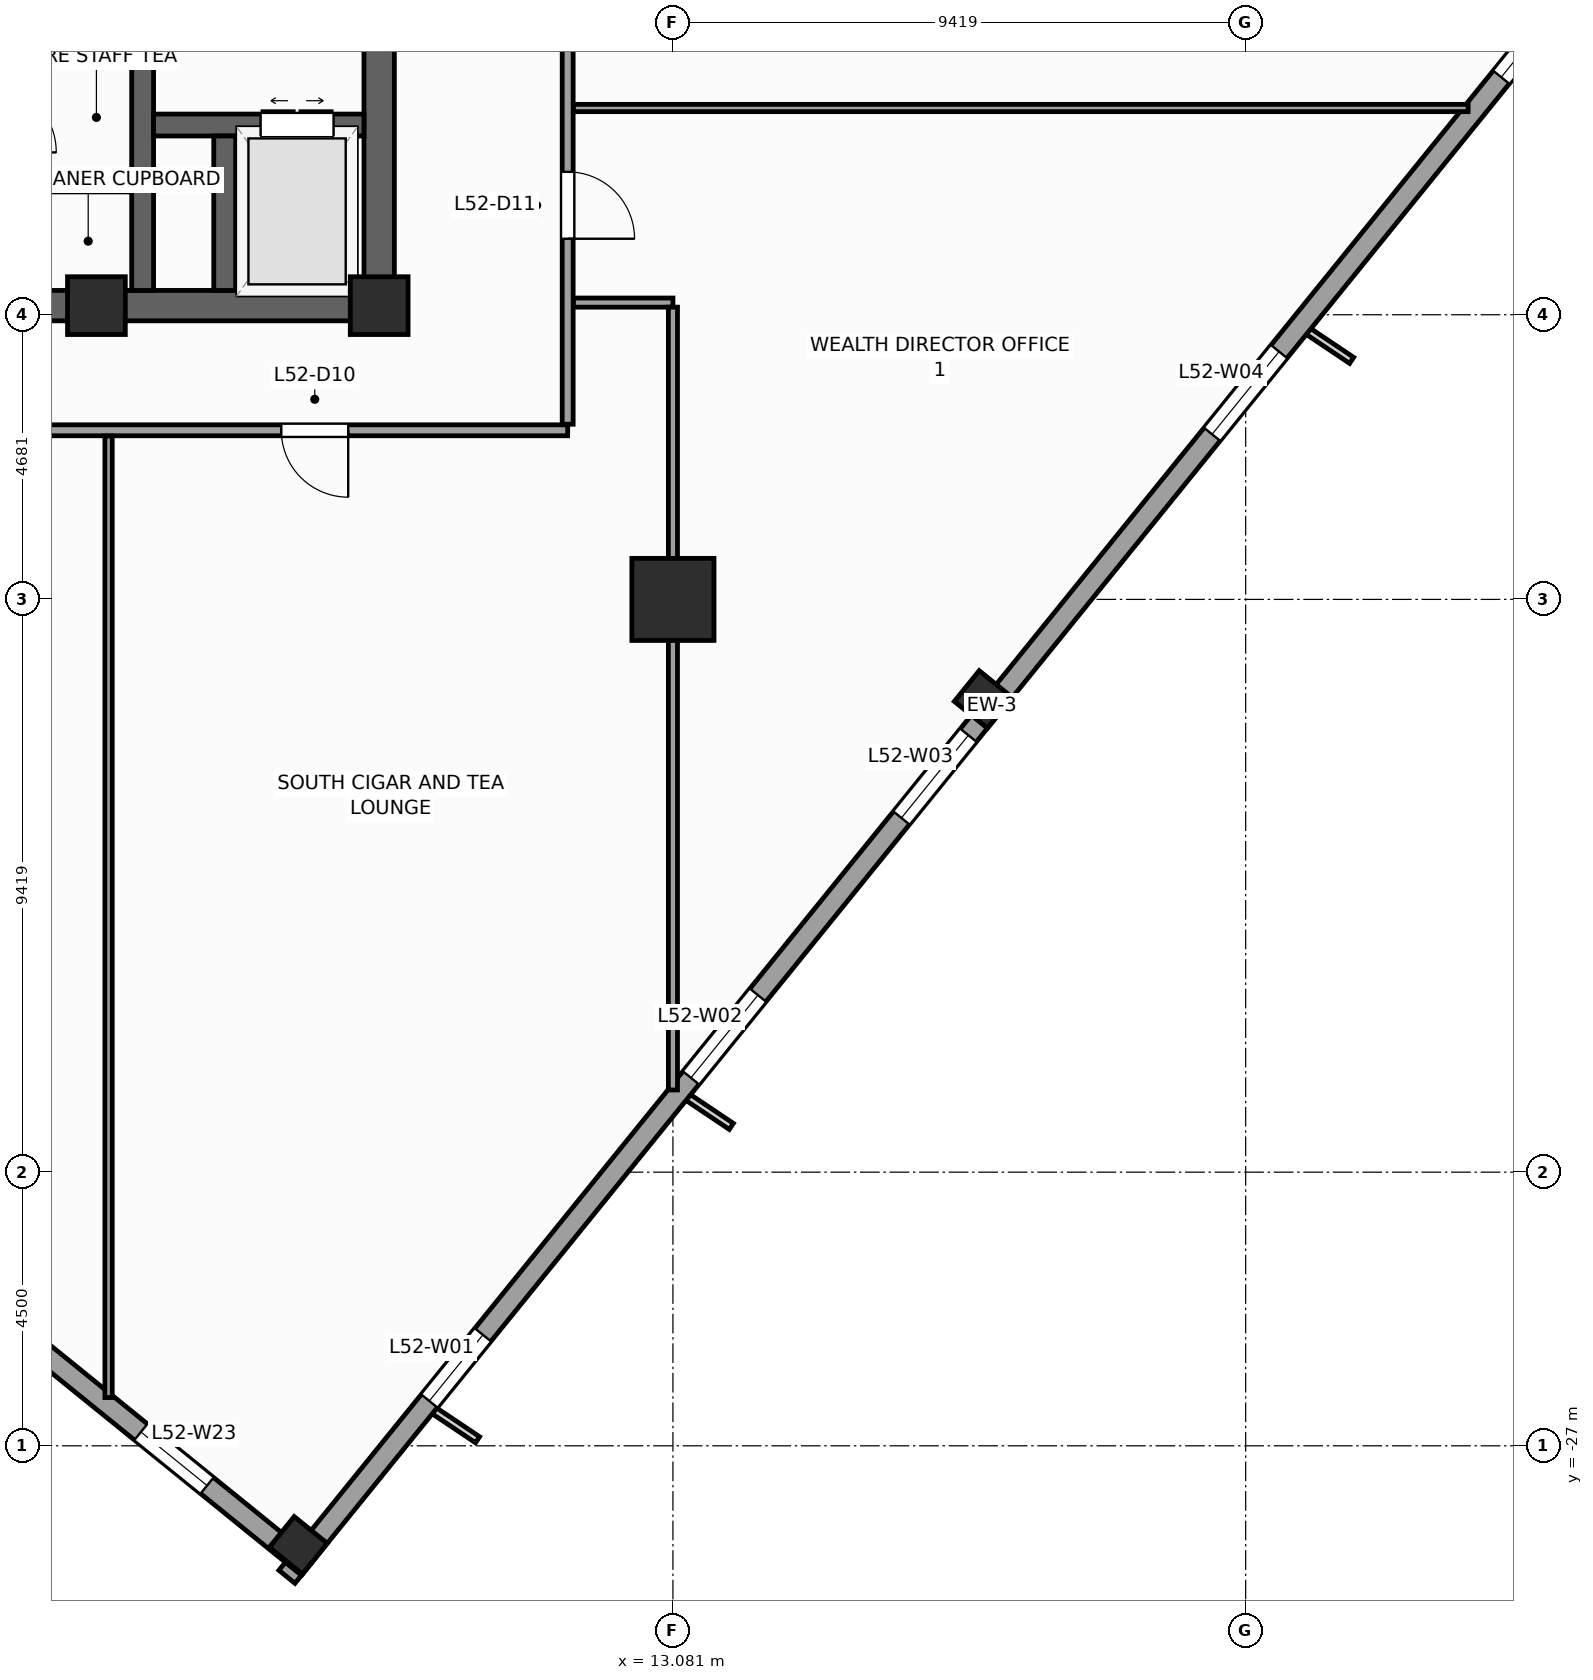
"""IFC4 building model, lengths in metres.
Left out: names, types, materials, properties, quantities, classifications, styles, units other than length and angle.
Written with IfcOpenShell. Run it as: python <this file> out.ifc"""

import sys

from ifc_helpers import new_model, si_unit, direction, frame, frame_2d, origin, origin_2d, place, context, subcontext, project, spatial, rectangle, extrude, source, transform, mapped, element, fill, save


model = new_model("IFC4")
c1 = context("Model", 3, precision=1e-05, world=origin(), true_north=direction((0.0, 1.0)))
c2 = subcontext(c1, "Body", "Model", "MODEL_VIEW")
j1 = project(units=[si_unit("LENGTHUNIT", "METRE"), si_unit("PLANEANGLEUNIT", "RADIAN")], contexts=[c1])
p1 = place(None, origin())
s1 = spatial("IfcSite", under=j1, at=p1, CompositionType="ELEMENT")
p2 = place(p1, origin())
s2 = spatial("IfcBuilding", under=s1, at=p2, CompositionType="ELEMENT")
p3 = place(p2, frame((0.0, 0.0, 217.3)))
s3 = spatial("IfcBuildingStorey", under=s2, at=p3, CompositionType="ELEMENT", Elevation=217.3)
p4 = place(p3, frame((-8.5, -8.25, 0.0), z_axis=(0.0, 0.0, 1.0), x_axis=(1.0, 0.0, 0.0)))
e1 = element("IfcWall", 1, at=p4, inside=s3, PredefinedType="SHEAR", context=c2, shape_type="SweptSolid", body=[
    extrude(rectangle(XDim=17.0, YDim=0.5, at=frame_2d((8.5, 0.0))), origin(), (0.0, 0.0, 1.0), 3.9),
])
p5 = place(p4, frame((7.85, 0.0, 0.0)))
e2 = element("IfcOpeningElement", 2, at=p5, cuts=e1, PredefinedType="OPENING", context=c2, shape_type="SweptSolid", body=[
    extrude(rectangle(XDim=1.3, YDim=2.2, at=frame_2d((0.65, 1.1))), frame((0.0, 0.26, 0.0), z_axis=(0.0, -1.0, 0.0), x_axis=(1.0, 0.0, 0.0)), (0.0, 0.0, 1.0), 0.52),
])
p6 = place(p3, frame((8.25, -8.0, 0.0), z_axis=(0.0, 0.0, 1.0), x_axis=(0.0, 1.0, 0.0)))
e3 = element("IfcWall", 3, at=p6, inside=s3, PredefinedType="SHEAR", context=c2, shape_type="SweptSolid", body=[
    extrude(rectangle(XDim=16.0, YDim=0.5, at=frame_2d((8.0, 0.0))), origin(), (0.0, 0.0, 1.0), 3.9),
])
p7 = place(p6, frame((4.69, 0.0, 0.0)))
e4 = element("IfcOpeningElement", 4, at=p7, cuts=e3, PredefinedType="OPENING", context=c2, shape_type="SweptSolid", body=[
    extrude(rectangle(XDim=1.3, YDim=2.2, at=frame_2d((0.65, 1.1))), frame((0.0, 0.26, 0.0), z_axis=(0.0, -1.0, 0.0), x_axis=(1.0, 0.0, 0.0)), (0.0, 0.0, 1.0), 0.52),
])
p8 = place(p3, frame((4.36, -8.0, 0.0), z_axis=(0.0, 0.0, 1.0), x_axis=(0.0, 1.0, 0.0)))
e5 = element("IfcWall", 5, at=p8, inside=s3, PredefinedType="SHEAR", context=c2, shape_type="SweptSolid", body=[
    extrude(rectangle(XDim=16.0, YDim=0.36, at=frame_2d((8.0, 0.0))), origin(), (0.0, 0.0, 1.0), 3.9),
])
p9 = place(p3, frame((4.54, -5.28, 0.0), z_axis=(0.0, 0.0, 1.0), x_axis=(1.0, 0.0, 0.0)))
e6 = element("IfcWall", 6, at=p9, inside=s3, PredefinedType="SHEAR", context=c2, shape_type="SweptSolid", body=[
    extrude(rectangle(XDim=3.46, YDim=0.36, at=frame_2d((1.73, 0.0))), origin(), (0.0, 0.0, 1.0), 3.9),
])
p10 = place(p9, frame((1.76, 0.0, 0.0)))
e7 = element("IfcOpeningElement", 7, at=p10, cuts=e6, PredefinedType="OPENING", context=c2, shape_type="SweptSolid", body=[
    extrude(rectangle(XDim=1.2, YDim=2.25, at=frame_2d((0.6, 1.125))), frame((0.0, 0.19, 0.0), z_axis=(0.0, -1.0, 0.0), x_axis=(1.0, 0.0, 0.0)), (0.0, 0.0, 1.0), 0.38),
])
p11 = place(p3, frame((5.71, -8.0, 0.0), z_axis=(0.0, 0.0, 1.0), x_axis=(0.0, 1.0, 0.0)))
e8 = element("IfcWall", 8, at=p11, inside=s3, PredefinedType="SHEAR", context=c2, shape_type="SweptSolid", body=[
    extrude(rectangle(XDim=2.54, YDim=0.36, at=frame_2d((1.27, 0.0))), origin(), (0.0, 0.0, 1.0), 3.9),
])
m1 = source(origin(), c2, "Body", "SweptSolid", [
    extrude(rectangle(XDim=0.95, YDim=0.95, at=origin_2d()), origin(), (0.0, 0.0, 1.0), 3.9),
])
for number, where, z_axis, x_axis in (
    (9, (8.25, -8.25, 0.0), (0.0, 0.0, 1.0), (1.0, 0.0, 0.0)),
    (10, (3.6, -8.25, 0.0), (0.0, 0.0, 1.0), (1.0, 0.0, 0.0)),
):
    element("IfcColumn", number, at=place(p3, frame(where, z_axis=z_axis, x_axis=x_axis)), inside=s3, PredefinedType="PILASTER", context=c2, shape_type="MappedRepresentation", body=[
        mapped(m1, transform((0.0, 0.0, 0.0), scale=1.0)),
    ])
m2 = source(origin(), c2, "Body", "SweptSolid", [
    extrude(rectangle(XDim=1.35, YDim=1.35, at=origin_2d()), origin(), (0.0, 0.0, 1.0), 3.9),
])
p12 = place(p3, frame((13.081, -13.081, 0.0), z_axis=(0.0, 0.0, 1.0), x_axis=(1.0, 0.0, 0.0)))
e11 = element("IfcColumn", 11, at=p12, inside=s3, PredefinedType="COLUMN", context=c2, shape_type="MappedRepresentation", body=[
    mapped(m2, transform((0.0, 0.0, 0.0), scale=1.0)),
])
m3 = source(origin(), c2, "Body", "SweptSolid", [
    extrude(rectangle(XDim=0.65, YDim=0.7, at=origin_2d()), origin(), (0.0, 0.0, 1.0), 3.9),
])
for number, where, z_axis, x_axis in (
    (12, (6.92, -28.637, 0.0), (0.0, 0.0, 1.0), (0.629, 0.777, 0.0)),
    (13, (18.185, -14.726, 0.0), (0.0, 0.0, 1.0), (0.629, 0.777, 0.0)),
):
    element("IfcColumn", number, at=place(p3, frame(where, z_axis=z_axis, x_axis=x_axis)), inside=s3, PredefinedType="COLUMN", context=c2, shape_type="MappedRepresentation", body=[
        mapped(m3, transform((0.0, 0.0, 0.0), scale=1.0)),
    ])
p13 = place(p3, frame((6.733, -29.154, 0.0), z_axis=(0.0, 0.0, 1.0), x_axis=(0.629325378072, 0.77714192302, 0.0)))
e14 = element("IfcWall", 14, at=p13, inside=s3, PredefinedType="STANDARD", context=c2, shape_type="SweptSolid", body=[
    extrude(rectangle(XDim=36.84, YDim=0.34, at=frame_2d((18.42, 0.0))), origin(), (0.0, 0.0, 1.0), 2.96),
])
p14 = place(p13, frame((3.721, 0.0, 0.48)))
e15 = element("IfcOpeningElement", 15, at=p14, cuts=e14, PredefinedType="OPENING", context=c2, shape_type="SweptSolid", body=[
    extrude(rectangle(XDim=1.4, YDim=2.4, at=frame_2d((0.7, 1.2))), frame((0.0, 0.18, 0.0), z_axis=(0.0, -1.0, 0.0), x_axis=(1.0, 0.0, 0.0)), (0.0, 0.0, 1.0), 0.36),
])
p15 = place(p13, frame((10.559, 0.0, 0.58)))
e16 = element("IfcOpeningElement", 16, at=p15, cuts=e14, PredefinedType="OPENING", context=c2, shape_type="SweptSolid", body=[
    extrude(rectangle(XDim=1.75, YDim=2.3, at=frame_2d((0.875, 1.15))), frame((0.0, 0.18, 0.0), z_axis=(0.0, -1.0, 0.0), x_axis=(1.0, 0.0, 0.0)), (0.0, 0.0, 1.0), 0.36),
])
p16 = place(p13, frame((16.058, 0.0, 0.58)))
e17 = element("IfcOpeningElement", 17, at=p16, cuts=e14, PredefinedType="OPENING", context=c2, shape_type="SweptSolid", body=[
    extrude(rectangle(XDim=1.75, YDim=2.3, at=frame_2d((0.875, 1.15))), frame((0.0, 0.18, 0.0), z_axis=(0.0, -1.0, 0.0), x_axis=(1.0, 0.0, 0.0)), (0.0, 0.0, 1.0), 0.36),
])
p17 = place(p13, frame((24.176, 0.0, 0.58)))
e18 = element("IfcOpeningElement", 18, at=p17, cuts=e14, PredefinedType="OPENING", context=c2, shape_type="SweptSolid", body=[
    extrude(rectangle(XDim=1.75, YDim=2.3, at=frame_2d((0.875, 1.15))), frame((0.0, 0.18, 0.0), z_axis=(0.0, -1.0, 0.0), x_axis=(1.0, 0.0, 0.0)), (0.0, 0.0, 1.0), 0.36),
])
p18 = place(p13, frame((31.732, 0.0, 0.48)))
e19 = element("IfcOpeningElement", 19, at=p18, cuts=e14, PredefinedType="OPENING", context=c2, shape_type="SweptSolid", body=[
    extrude(rectangle(XDim=1.4, YDim=2.4, at=frame_2d((0.7, 1.2))), frame((0.0, 0.18, 0.0), z_axis=(0.0, -1.0, 0.0), x_axis=(1.0, 0.0, 0.0)), (0.0, 0.0, 1.0), 0.36),
])
p19 = place(p3, frame((2.673, -25.429, 0.0), z_axis=(0.0, 0.0, 1.0), x_axis=(0.777162640055, -0.629299794138, 0.0)))
e20 = element("IfcWall", 20, at=p19, inside=s3, PredefinedType="STANDARD", context=c2, shape_type="SweptSolid", body=[
    extrude(rectangle(XDim=5.67, YDim=0.34, at=frame_2d((2.835, 0.0))), origin(), (0.0, 0.0, 1.0), 3.66),
])
p20 = place(p19, frame((2.135, 0.0, 0.48)))
e21 = element("IfcOpeningElement", 21, at=p20, cuts=e20, PredefinedType="OPENING", context=c2, shape_type="SweptSolid", body=[
    extrude(rectangle(XDim=1.4, YDim=2.4, at=frame_2d((0.7, 1.2))), frame((0.0, 0.18, 0.0), z_axis=(0.0, -1.0, 0.0), x_axis=(1.0, 0.0, 0.0)), (0.0, 0.0, 1.0), 0.36),
])
p21 = place(p3, frame((1.89, -6.3, 0.0), z_axis=(0.0, 0.0, 1.0), x_axis=(1.0, 0.0, 0.0)))
e22 = element("IfcWall", 22, at=p21, inside=s3, PredefinedType="PARTITIONING", context=c2, shape_type="SweptSolid", body=[
    extrude(rectangle(XDim=2.28, YDim=0.16, at=frame_2d((1.14, 0.0))), origin(), (0.0, 0.0, 1.0), 3.66),
])
p22 = place(p3, frame((-11.4, -10.3, 0.0), z_axis=(0.0, 0.0, 1.0), x_axis=(1.0, 0.0, 0.0)))
e23 = element("IfcWall", 23, at=p22, inside=s3, PredefinedType="PARTITIONING", context=c2, shape_type="SweptSolid", body=[
    extrude(rectangle(XDim=22.75, YDim=0.18, at=frame_2d((11.375, 0.0))), origin(), (0.0, 0.0, 1.0), 3.66),
])
p23 = place(p22, frame((8.436, 0.0, 0.0)))
e24 = element("IfcOpeningElement", 24, at=p23, cuts=e23, PredefinedType="OPENING", context=c2, shape_type="SweptSolid", body=[
    extrude(rectangle(XDim=0.95, YDim=2.1, at=frame_2d((0.475, 1.05))), frame((0.0, 0.1, 0.0), z_axis=(0.0, -1.0, 0.0), x_axis=(1.0, 0.0, 0.0)), (0.0, 0.0, 1.0), 0.2),
])
p24 = place(p22, frame((1.58, 0.0, 0.0)))
e25 = element("IfcOpeningElement", 25, at=p24, cuts=e23, PredefinedType="OPENING", context=c2, shape_type="SweptSolid", body=[
    extrude(rectangle(XDim=0.95, YDim=2.1, at=frame_2d((0.475, 1.05))), frame((0.0, 0.1, 0.0), z_axis=(0.0, -1.0, 0.0), x_axis=(1.0, 0.0, 0.0)), (0.0, 0.0, 1.0), 0.2),
])
p25 = place(p22, frame((4.834, 0.0, 0.0)))
e26 = element("IfcOpeningElement", 26, at=p25, cuts=e23, PredefinedType="OPENING", context=c2, shape_type="SweptSolid", body=[
    extrude(rectangle(XDim=1.1, YDim=2.2, at=frame_2d((0.55, 1.1))), frame((0.0, 0.1, 0.0), z_axis=(0.0, -1.0, 0.0), x_axis=(1.0, 0.0, 0.0)), (0.0, 0.0, 1.0), 0.2),
])
p26 = place(p22, frame((12.0, 0.0, 0.0)))
e27 = element("IfcOpeningElement", 27, at=p26, cuts=e23, PredefinedType="OPENING", context=c2, shape_type="SweptSolid", body=[
    extrude(rectangle(XDim=1.1, YDim=2.2, at=frame_2d((0.55, 1.1))), frame((0.0, 0.1, 0.0), z_axis=(0.0, -1.0, 0.0), x_axis=(1.0, 0.0, 0.0)), (0.0, 0.0, 1.0), 0.2),
])
p27 = place(p22, frame((18.041, 0.0, 0.0)))
e28 = element("IfcOpeningElement", 28, at=p27, cuts=e23, PredefinedType="OPENING", context=c2, shape_type="SweptSolid", body=[
    extrude(rectangle(XDim=1.1, YDim=2.2, at=frame_2d((0.55, 1.1))), frame((0.0, 0.1, 0.0), z_axis=(0.0, -1.0, 0.0), x_axis=(1.0, 0.0, 0.0)), (0.0, 0.0, 1.0), 0.2),
])
p28 = place(p3, frame((11.35, -10.2, 0.0), z_axis=(0.0, 0.0, 1.0), x_axis=(0.0, 1.0, 0.0)))
e29 = element("IfcWall", 29, at=p28, inside=s3, PredefinedType="PARTITIONING", context=c2, shape_type="SweptSolid", body=[
    extrude(rectangle(XDim=8.8, YDim=0.18, at=frame_2d((4.4, 0.0))), origin(), (0.0, 0.0, 1.0), 3.66),
])
p29 = place(p28, frame((3.05, 0.0, 0.0)))
e30 = element("IfcOpeningElement", 30, at=p29, cuts=e29, PredefinedType="OPENING", context=c2, shape_type="SweptSolid", body=[
    extrude(rectangle(XDim=1.1, YDim=2.2, at=frame_2d((0.55, 1.1))), frame((0.0, 0.1, 0.0), z_axis=(0.0, -1.0, 0.0), x_axis=(1.0, 0.0, 0.0)), (0.0, 0.0, 1.0), 0.2),
])
p30 = place(p28, frame((6.286, 0.0, 0.0)))
e31 = element("IfcOpeningElement", 31, at=p30, cuts=e29, PredefinedType="OPENING", context=c2, shape_type="SweptSolid", body=[
    extrude(rectangle(XDim=1.1, YDim=2.2, at=frame_2d((0.55, 1.1))), frame((0.0, 0.1, 0.0), z_axis=(0.0, -1.0, 0.0), x_axis=(1.0, 0.0, 0.0)), (0.0, 0.0, 1.0), 0.2),
])
p31 = place(p3, frame((3.8, -26.207, 0.0), z_axis=(0.0, 0.0, 1.0), x_axis=(0.0, 1.0, 0.0)))
e32 = element("IfcWall", 32, at=p31, inside=s3, PredefinedType="PARTITIONING", context=c2, shape_type="SweptSolid", body=[
    extrude(rectangle(XDim=15.812, YDim=0.12, at=frame_2d((7.906, 0.0))), origin(), (0.0, 0.0, 1.0), 3.66),
])
p32 = place(p3, frame((11.445, -8.2, 0.0), z_axis=(0.0, 0.0, 1.0), x_axis=(1.0, 0.0, 0.0)))
e33 = element("IfcWall", 33, at=p32, inside=s3, PredefinedType="PARTITIONING", context=c2, shape_type="SweptSolid", body=[
    extrude(rectangle(XDim=1.636, YDim=0.15, at=frame_2d((0.818, 0.0))), origin(), (0.0, 0.0, 1.0), 3.66),
])
p33 = place(p3, frame((13.081, -8.275, 0.0), z_axis=(0.0, 0.0, 1.0), x_axis=(0.0, -1.0, 0.0)))
e34 = element("IfcWall", 34, at=p33, inside=s3, PredefinedType="PARTITIONING", context=c2, shape_type="SweptSolid", body=[
    extrude(rectangle(XDim=12.874, YDim=0.15, at=frame_2d((6.437, 0.0))), origin(), (0.0, 0.0, 1.0), 2.76),
])
p34 = place(p3, frame((11.445, -5.0, 0.0), z_axis=(0.0, 0.0, 1.0), x_axis=(1.0, 0.0, 0.0)))
e35 = element("IfcWall", 35, at=p34, inside=s3, PredefinedType="PARTITIONING", context=c2, shape_type="SweptSolid", body=[
    extrude(rectangle(XDim=14.713, YDim=0.12, at=frame_2d((7.356, 0.0))), origin(), (0.0, 0.0, 1.0), 3.66),
])
m4 = source(origin(), c2, "Body", "SweptSolid", [
    extrude(rectangle(XDim=1.4, YDim=2.4, at=frame_2d((0.7, 1.2))), frame((0.0, 0.03, 0.0), z_axis=(0.0, -1.0, 0.0), x_axis=(1.0, 0.0, 0.0)), (0.0, 0.0, 1.0), 0.06),
])
p35 = place(p14, origin())
e36 = element("IfcWindow", 36, at=p35, inside=s3, PartitioningType="SINGLE_PANEL", PredefinedType="WINDOW", context=c2, shape_type="MappedRepresentation", body=[
    mapped(m4, transform((0.0, 0.0, 0.0), scale=1.0)),
])
fill(e15, e36)
m5 = source(origin(), c2, "Body", "SweptSolid", [
    extrude(rectangle(XDim=1.75, YDim=2.3, at=frame_2d((0.875, 1.15))), frame((0.0, 0.03, 0.0), z_axis=(0.0, -1.0, 0.0), x_axis=(1.0, 0.0, 0.0)), (0.0, 0.0, 1.0), 0.06),
])
p36 = place(p15, origin())
e37 = element("IfcWindow", 37, at=p36, inside=s3, PartitioningType="SINGLE_PANEL", PredefinedType="WINDOW", context=c2, shape_type="MappedRepresentation", body=[
    mapped(m5, transform((0.0, 0.0, 0.0), scale=1.0)),
])
fill(e16, e37)
p37 = place(p16, origin())
e38 = element("IfcWindow", 38, at=p37, inside=s3, PartitioningType="SINGLE_PANEL", PredefinedType="WINDOW", context=c2, shape_type="MappedRepresentation", body=[
    mapped(m5, transform((0.0, 0.0, 0.0), scale=1.0)),
])
fill(e17, e38)
p38 = place(p17, origin())
e39 = element("IfcWindow", 39, at=p38, inside=s3, PartitioningType="SINGLE_PANEL", PredefinedType="WINDOW", context=c2, shape_type="MappedRepresentation", body=[
    mapped(m5, transform((0.0, 0.0, 0.0), scale=1.0)),
])
fill(e18, e39)
p39 = place(p18, origin())
e40 = element("IfcWindow", 40, at=p39, inside=s3, PartitioningType="SINGLE_PANEL", PredefinedType="WINDOW", context=c2, shape_type="MappedRepresentation", body=[
    mapped(m4, transform((0.0, 0.0, 0.0), scale=1.0)),
])
fill(e19, e40)
p40 = place(p20, origin())
e41 = element("IfcWindow", 41, at=p40, inside=s3, PartitioningType="SINGLE_PANEL", PredefinedType="WINDOW", context=c2, shape_type="MappedRepresentation", body=[
    mapped(m4, transform((0.0, 0.0, 0.0), scale=1.0)),
])
fill(e21, e41)
m6 = source(origin(), c2, "Body", "SweptSolid", [
    extrude(rectangle(XDim=1.2, YDim=2.25, at=frame_2d((0.6, 1.125))), frame((0.0, 0.025, 0.0), z_axis=(0.0, -1.0, 0.0), x_axis=(1.0, 0.0, 0.0)), (0.0, 0.0, 1.0), 0.05),
])
p41 = place(p10, origin())
e42 = element("IfcDoor", 42, at=p41, inside=s3, OperationType="DOUBLE_DOOR_SLIDING", PredefinedType="DOOR", context=c2, shape_type="MappedRepresentation", body=[
    mapped(m6, transform((0.0, 0.0, 0.0), scale=1.0)),
])
fill(e7, e42)
m7 = source(origin(), c2, "Body", "SweptSolid", [
    extrude(rectangle(XDim=1.1, YDim=2.2, at=frame_2d((0.55, 1.1))), frame((0.0, 0.025, 0.0), z_axis=(0.0, -1.0, 0.0), x_axis=(1.0, 0.0, 0.0)), (0.0, 0.0, 1.0), 0.05),
])
p42 = place(p27, frame((1.1, 0.0, 0.0), z_axis=(0.0, 0.0, 1.0), x_axis=(-1.0, 0.0, 0.0)))
e43 = element("IfcDoor", 43, at=p42, inside=s3, OperationType="SINGLE_SWING_RIGHT", PredefinedType="DOOR", context=c2, shape_type="MappedRepresentation", body=[
    mapped(m7, transform((0.0, 0.0, 0.0), scale=1.0)),
])
fill(e28, e43)
p43 = place(p29, frame((1.1, 0.0, 0.0), z_axis=(0.0, 0.0, 1.0), x_axis=(-1.0, 0.0, 0.0)))
e44 = element("IfcDoor", 44, at=p43, inside=s3, OperationType="SINGLE_SWING_LEFT", PredefinedType="DOOR", context=c2, shape_type="MappedRepresentation", body=[
    mapped(m7, transform((0.0, 0.0, 0.0), scale=1.0)),
])
fill(e30, e44)
save(model, sys.argv[1])
